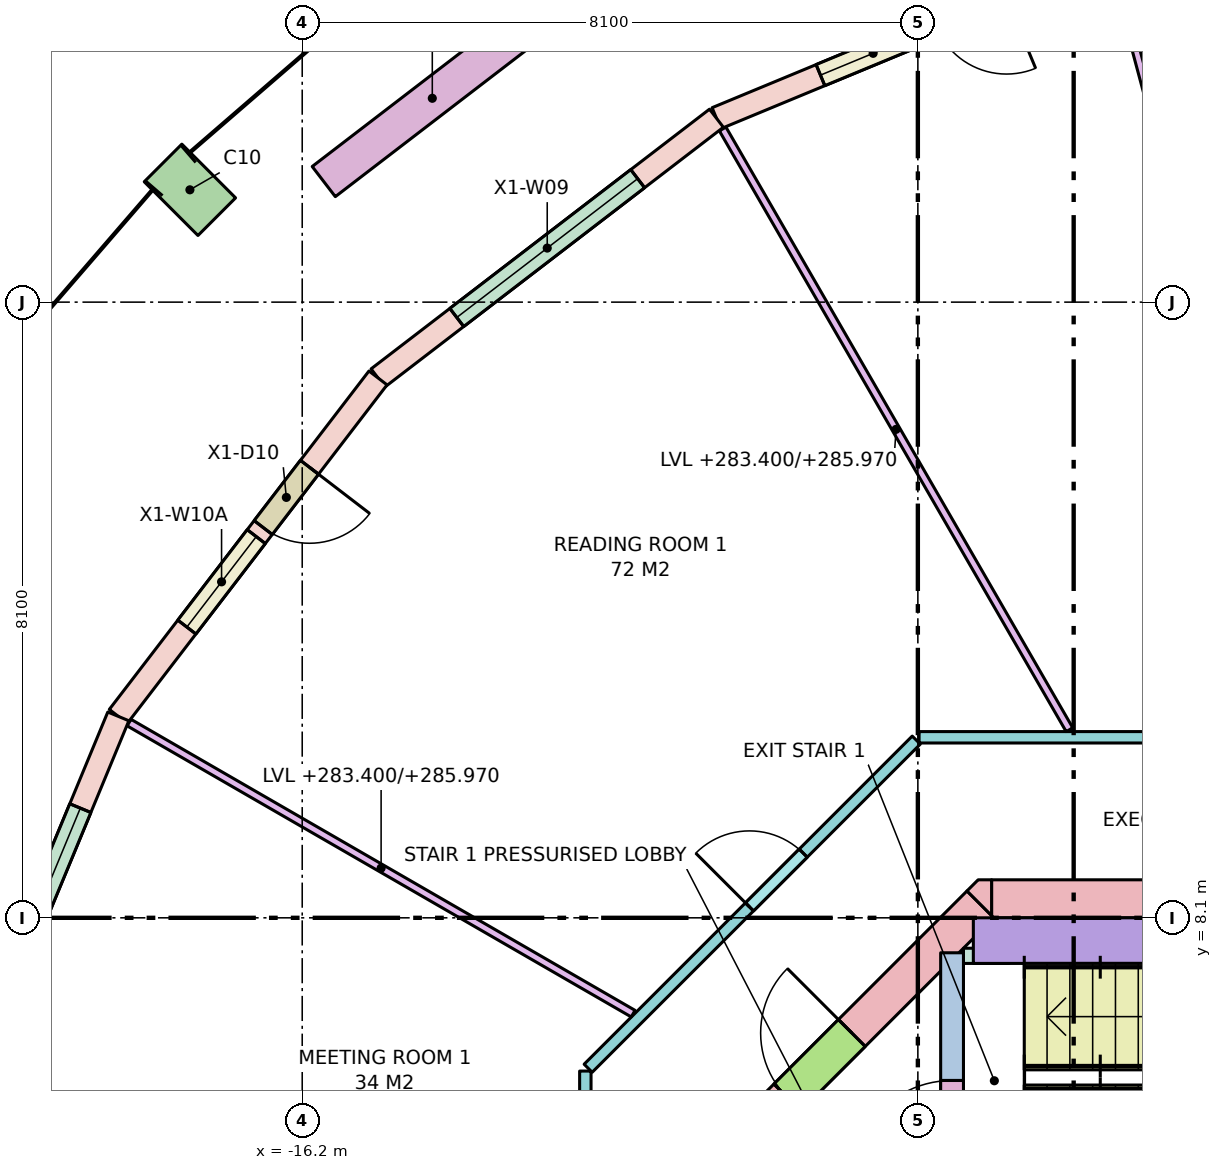
"""IFC4 building model, lengths in metres.
Left out: names, types, materials, properties, quantities, classifications, styles, units other than length and angle.
Written with IfcOpenShell. Run it as: python <this file> out.ifc"""

import sys

from ifc_helpers import new_model, si_unit, direction, frame, frame_2d, origin, origin_2d, place, context, subcontext, project, spatial, polyline, rectangle, outline, extrude, element, fill, save


model = new_model("IFC4")
c1 = context("Model", 3, precision=1e-05, world=origin(), true_north=direction((0.0, 1.0)))
c2 = subcontext(c1, "Body", "Model", "MODEL_VIEW")
j1 = project(units=[si_unit("LENGTHUNIT", "METRE"), si_unit("PLANEANGLEUNIT", "RADIAN")], contexts=[c1])
p1 = place(None, origin())
s1 = spatial("IfcSite", under=j1, at=p1, CompositionType="ELEMENT")
p2 = place(p1, origin())
s2 = spatial("IfcBuilding", under=s1, at=p2, CompositionType="ELEMENT")
p3 = place(p2, frame((0.0, 0.0, 283.4)))
s3 = spatial("IfcBuildingStorey", under=s2, at=p3, CompositionType="ELEMENT", Elevation=283.4)
p4 = place(p3, frame((-17.678, 17.678, 0.0), z_axis=(0.0, 0.0, 1.0), x_axis=(-0.707106781187, -0.707106781187, 0.0)))
e1 = element("IfcColumn", 1, at=p4, inside=s3, PredefinedType="COLUMN", context=c2, shape_type="SweptSolid", body=[
    extrude(rectangle(XDim=0.7, YDim=1.0, at=origin_2d()), origin(), (0.0, 0.0, 1.0), 3.7),
])
p5 = place(p3, frame((-7.13, 8.35, -0.28), z_axis=(0.0, 0.0, 1.0), x_axis=(1.0, 0.0, 0.0)))
e2 = element("IfcWall", 2, at=p5, inside=s3, PredefinedType="SHEAR", context=c2, shape_type="SweptSolid", body=[
    extrude(rectangle(XDim=14.26, YDim=0.5, at=frame_2d((7.13, 0.0))), origin(), (0.0, 0.0, 1.0), 3.7),
])
p6 = place(p5, frame((5.48, 0.0, 0.28)))
e3 = element("IfcOpeningElement", 3, at=p6, cuts=e2, PredefinedType="OPENING", context=c2, shape_type="SweptSolid", body=[
    extrude(rectangle(XDim=0.7, YDim=2.1, at=frame_2d((0.35, 1.05))), frame((0.0, 0.26, 0.0), z_axis=(0.0, -1.0, 0.0), x_axis=(1.0, 0.0, 0.0)), (0.0, 0.0, 1.0), 0.52),
])
p7 = place(p5, frame((7.155, 0.0, 0.28)))
e4 = element("IfcOpeningElement", 4, at=p7, cuts=e2, PredefinedType="OPENING", context=c2, shape_type="SweptSolid", body=[
    extrude(rectangle(XDim=0.9, YDim=2.1, at=frame_2d((0.45, 1.05))), frame((0.0, 0.26, 0.0), z_axis=(0.0, -1.0, 0.0), x_axis=(1.0, 0.0, 0.0)), (0.0, 0.0, 1.0), 0.52),
])
p8 = place(p3, frame((-10.277, 5.277, -0.28), z_axis=(0.0, 0.0, 1.0), x_axis=(0.707106781187, 0.707106781187, 0.0)))
e5 = element("IfcWall", 5, at=p8, inside=s3, PredefinedType="SHEAR", context=c2, shape_type="SweptSolid", body=[
    extrude(rectangle(XDim=4.243, YDim=0.5, at=frame_2d((2.121, 0.0))), origin(), (0.0, 0.0, 1.0), 3.7),
])
p9 = place(p8, frame((0.65, 0.0, 0.28)))
e6 = element("IfcOpeningElement", 6, at=p9, cuts=e5, PredefinedType="OPENING", context=c2, shape_type="SweptSolid", body=[
    extrude(rectangle(XDim=1.2, YDim=2.1, at=frame_2d((0.6, 1.05))), frame((0.0, 0.26, 0.0), z_axis=(0.0, -1.0, 0.0), x_axis=(1.0, 0.0, 0.0)), (0.0, 0.0, 1.0), 0.52),
])
p10 = place(p3, frame((0.0, 0.0, -0.28)))
e7 = element("IfcWall", 7, at=p10, inside=s3, PredefinedType="SHEAR", context=c2, shape_type="SweptSolid", body=[
    extrude(outline(polyline([(-7.307, 8.6), (-7.13, 8.6), (-7.13, 8.13), (-7.454, 8.454), (-7.307, 8.6)])), origin(), (0.0, 0.0, 1.0), 3.7),
])
p11 = place(p3, frame((-7.65, 4.5, 0.0), z_axis=(0.0, 0.0, 1.0), x_axis=(0.0, 1.0, 0.0)))
e8 = element("IfcWall", 8, at=p11, inside=s3, PredefinedType="SHEAR", context=c2, shape_type="SweptSolid", body=[
    extrude(rectangle(XDim=3.14, YDim=0.3, at=frame_2d((1.57, 0.0))), origin(), (0.0, 0.0, 1.0), 3.42),
])
p12 = place(p11, frame((0.14, 0.0, 0.0)))
e9 = element("IfcOpeningElement", 9, at=p12, cuts=e8, PredefinedType="OPENING", context=c2, shape_type="SweptSolid", body=[
    extrude(rectangle(XDim=1.32, YDim=2.1, at=frame_2d((0.66, 1.05))), frame((0.0, 0.16, 0.0), z_axis=(0.0, -1.0, 0.0), x_axis=(1.0, 0.0, 0.0)), (0.0, 0.0, 1.0), 0.32),
])
p13 = place(p3, frame((-7.37, 7.8, 0.0), z_axis=(0.0, 0.0, 1.0), x_axis=(1.0, 0.0, 0.0)))
e10 = element("IfcWall", 10, at=p13, inside=s3, PredefinedType="SHEAR", context=c2, shape_type="SweptSolid", body=[
    extrude(rectangle(XDim=5.37, YDim=0.6, at=frame_2d((2.685, 0.0))), origin(), (0.0, 0.0, 1.0), 3.42),
])
p14 = place(p3, frame((-7.5, 7.6, 0.0), z_axis=(0.0, 0.0, 1.0), x_axis=(1.0, 0.0, 0.0)))
e11 = element("IfcWall", 11, at=p14, inside=s3, PredefinedType="SHEAR", context=c2, shape_type="SweptSolid", body=[
    extrude(rectangle(XDim=0.6, YDim=0.2, at=frame_2d((0.3, 0.0))), origin(), (0.0, 0.0, 1.0), 3.42),
])
p15 = place(p3, frame((-5.565, 20.767, 0.0), z_axis=(0.0, 0.0, 1.0), x_axis=(-0.92387156362, -0.382702670405, 0.0)))
e12 = element("IfcWall", 12, at=p15, inside=s3, PredefinedType="STANDARD", context=c2, shape_type="SweptSolid", body=[
    extrude(rectangle(XDim=5.613, YDim=0.3, at=frame_2d((2.806, 0.0))), origin(), (0.0, 0.0, 1.0), 3.42),
])
p16 = place(p15, frame((1.481, 0.0, 0.0)))
e13 = element("IfcOpeningElement", 13, at=p16, cuts=e12, PredefinedType="OPENING", context=c2, shape_type="SweptSolid", body=[
    extrude(rectangle(XDim=1.0, YDim=2.4, at=frame_2d((0.5, 1.2))), frame((0.0, 0.16, 0.0), z_axis=(0.0, -1.0, 0.0), x_axis=(1.0, 0.0, 0.0)), (0.0, 0.0, 1.0), 0.32),
])
p17 = place(p15, frame((2.631, 0.0, 0.8)))
e14 = element("IfcOpeningElement", 14, at=p17, cuts=e12, PredefinedType="OPENING", context=c2, shape_type="SweptSolid", body=[
    extrude(rectangle(XDim=1.5, YDim=2.4, at=frame_2d((0.75, 1.2))), frame((0.0, 0.16, 0.0), z_axis=(0.0, -1.0, 0.0), x_axis=(1.0, 0.0, 0.0)), (0.0, 0.0, 1.0), 0.32),
])
p18 = place(p3, frame((-10.75, 18.619, 0.0), z_axis=(0.0, 0.0, 1.0), x_axis=(-0.793380165925, -0.608726467567, 0.0)))
e15 = element("IfcWall", 15, at=p18, inside=s3, PredefinedType="STANDARD", context=c2, shape_type="SweptSolid", body=[
    extrude(rectangle(XDim=5.613, YDim=0.3, at=frame_2d((2.806, 0.0))), origin(), (0.0, 0.0, 1.0), 3.42),
])
p19 = place(p18, frame((1.306, 0.0, 0.8)))
e16 = element("IfcOpeningElement", 16, at=p19, cuts=e15, PredefinedType="OPENING", context=c2, shape_type="SweptSolid", body=[
    extrude(rectangle(XDim=3.0, YDim=2.4, at=frame_2d((1.5, 1.2))), frame((0.0, 0.16, 0.0), z_axis=(0.0, -1.0, 0.0), x_axis=(1.0, 0.0, 0.0)), (0.0, 0.0, 1.0), 0.32),
])
p20 = place(p3, frame((-15.203, 15.203, 0.0), z_axis=(0.0, 0.0, 1.0), x_axis=(-0.608726467567, -0.793380165925, 0.0)))
e17 = element("IfcWall", 17, at=p20, inside=s3, PredefinedType="STANDARD", context=c2, shape_type="SweptSolid", body=[
    extrude(rectangle(XDim=5.613, YDim=0.3, at=frame_2d((2.806, 0.0))), origin(), (0.0, 0.0, 1.0), 3.42),
])
p21 = place(p20, frame((1.481, 0.0, 0.0)))
e18 = element("IfcOpeningElement", 18, at=p21, cuts=e17, PredefinedType="OPENING", context=c2, shape_type="SweptSolid", body=[
    extrude(rectangle(XDim=1.0, YDim=2.4, at=frame_2d((0.5, 1.2))), frame((0.0, 0.16, 0.0), z_axis=(0.0, -1.0, 0.0), x_axis=(1.0, 0.0, 0.0)), (0.0, 0.0, 1.0), 0.32),
])
p22 = place(p20, frame((2.631, 0.0, 0.8)))
e19 = element("IfcOpeningElement", 19, at=p22, cuts=e17, PredefinedType="OPENING", context=c2, shape_type="SweptSolid", body=[
    extrude(rectangle(XDim=1.5, YDim=2.4, at=frame_2d((0.75, 1.2))), frame((0.0, 0.16, 0.0), z_axis=(0.0, -1.0, 0.0), x_axis=(1.0, 0.0, 0.0)), (0.0, 0.0, 1.0), 0.32),
])
p23 = place(p3, frame((-18.619, 10.75, 0.0), z_axis=(0.0, 0.0, 1.0), x_axis=(-0.382702670405, -0.92387156362, 0.0)))
e20 = element("IfcWall", 20, at=p23, inside=s3, PredefinedType="STANDARD", context=c2, shape_type="SweptSolid", body=[
    extrude(rectangle(XDim=5.613, YDim=0.3, at=frame_2d((2.806, 0.0))), origin(), (0.0, 0.0, 1.0), 3.42),
])
p24 = place(p23, frame((1.306, 0.0, 0.8)))
e21 = element("IfcOpeningElement", 21, at=p24, cuts=e20, PredefinedType="OPENING", context=c2, shape_type="SweptSolid", body=[
    extrude(rectangle(XDim=3.0, YDim=2.4, at=frame_2d((1.5, 1.2))), frame((0.0, 0.16, 0.0), z_axis=(0.0, -1.0, 0.0), x_axis=(1.0, 0.0, 0.0)), (0.0, 0.0, 1.0), 0.32),
])
p25 = place(p3, frame((-13.061, 19.978, 0.0), z_axis=(0.0, 0.0, 1.0), x_axis=(-0.793326845617, -0.608795955984, 0.0)))
e22 = element("IfcWall", 22, at=p25, inside=s3, PredefinedType="PARAPET", context=c2, shape_type="SweptSolid", body=[
    extrude(rectangle(XDim=3.6, YDim=0.5, at=frame_2d((1.8, 0.0))), origin(), (0.0, 0.0, 1.0), 0.9),
])
p26 = place(p3, frame((-12.475, -6.084, 0.0), z_axis=(0.0, 0.0, 1.0), x_axis=(0.0, 1.0, 0.0)))
e23 = element("IfcWall", 23, at=p26, inside=s3, PredefinedType="PARTITIONING", context=c2, shape_type="SweptSolid", body=[
    extrude(rectangle(XDim=12.167, YDim=0.15, at=frame_2d((6.084, 0.0))), origin(), (0.0, 0.0, 1.0), 2.57),
])
p27 = place(p26, frame((10.322, 0.0, 0.0)))
e24 = element("IfcOpeningElement", 24, at=p27, cuts=e23, PredefinedType="OPENING", context=c2, shape_type="SweptSolid", body=[
    extrude(rectangle(XDim=0.9, YDim=2.1, at=frame_2d((0.45, 1.05))), frame((0.0, 0.085, 0.0), z_axis=(0.0, -1.0, 0.0), x_axis=(1.0, 0.0, 0.0)), (0.0, 0.0, 1.0), 0.17),
])
p28 = place(p26, frame((7.256, 0.0, 0.0)))
e25 = element("IfcOpeningElement", 25, at=p28, cuts=e23, PredefinedType="OPENING", context=c2, shape_type="SweptSolid", body=[
    extrude(rectangle(XDim=1.0, YDim=2.1, at=frame_2d((0.5, 1.05))), frame((0.0, 0.085, 0.0), z_axis=(0.0, -1.0, 0.0), x_axis=(1.0, 0.0, 0.0)), (0.0, 0.0, 1.0), 0.17),
])
p29 = place(p26, frame((3.912, 0.0, 0.0)))
e26 = element("IfcOpeningElement", 26, at=p29, cuts=e23, PredefinedType="OPENING", context=c2, shape_type="SweptSolid", body=[
    extrude(rectangle(XDim=1.0, YDim=2.1, at=frame_2d((0.5, 1.05))), frame((0.0, 0.085, 0.0), z_axis=(0.0, -1.0, 0.0), x_axis=(1.0, 0.0, 0.0)), (0.0, 0.0, 1.0), 0.17),
])
p30 = place(p26, frame((0.946, 0.0, 0.0)))
e27 = element("IfcOpeningElement", 27, at=p30, cuts=e23, PredefinedType="OPENING", context=c2, shape_type="SweptSolid", body=[
    extrude(rectangle(XDim=0.9, YDim=2.1, at=frame_2d((0.45, 1.05))), frame((0.0, 0.085, 0.0), z_axis=(0.0, -1.0, 0.0), x_axis=(1.0, 0.0, 0.0)), (0.0, 0.0, 1.0), 0.17),
])
p31 = place(p3, frame((-12.438, 6.121, 0.0), z_axis=(0.0, 0.0, 1.0), x_axis=(0.707106781187, 0.707106781187, 0.0)))
e28 = element("IfcWall", 28, at=p31, inside=s3, PredefinedType="PARTITIONING", context=c2, shape_type="SweptSolid", body=[
    extrude(rectangle(XDim=6.105, YDim=0.15, at=frame_2d((3.053, 0.0))), origin(), (0.0, 0.0, 1.0), 2.57),
])
p32 = place(p31, frame((3.002, 0.0, 0.0)))
e29 = element("IfcOpeningElement", 29, at=p32, cuts=e28, PredefinedType="OPENING", context=c2, shape_type="SweptSolid", body=[
    extrude(rectangle(XDim=1.0, YDim=2.1, at=frame_2d((0.5, 1.05))), frame((0.0, 0.085, 0.0), z_axis=(0.0, -1.0, 0.0), x_axis=(1.0, 0.0, 0.0)), (0.0, 0.0, 1.0), 0.17),
])
p33 = place(p3, frame((-8.084, 10.475, 0.0), z_axis=(0.0, 0.0, 1.0), x_axis=(1.0, 0.0, 0.0)))
e30 = element("IfcWall", 30, at=p33, inside=s3, PredefinedType="PARTITIONING", context=c2, shape_type="SweptSolid", body=[
    extrude(rectangle(XDim=16.167, YDim=0.15, at=frame_2d((8.084, 0.0))), origin(), (0.0, 0.0, 1.0), 2.57),
])
p34 = place(p33, frame((13.004, 0.0, 0.0)))
e31 = element("IfcOpeningElement", 31, at=p34, cuts=e30, PredefinedType="OPENING", context=c2, shape_type="SweptSolid", body=[
    extrude(rectangle(XDim=1.0, YDim=2.1, at=frame_2d((0.5, 1.05))), frame((0.0, 0.085, 0.0), z_axis=(0.0, -1.0, 0.0), x_axis=(1.0, 0.0, 0.0)), (0.0, 0.0, 1.0), 0.17),
])
p35 = place(p33, frame((7.184, 0.0, 0.0)))
e32 = element("IfcOpeningElement", 32, at=p35, cuts=e30, PredefinedType="OPENING", context=c2, shape_type="SweptSolid", body=[
    extrude(rectangle(XDim=1.8, YDim=2.1, at=frame_2d((0.9, 1.05))), frame((0.0, 0.085, 0.0), z_axis=(0.0, -1.0, 0.0), x_axis=(1.0, 0.0, 0.0)), (0.0, 0.0, 1.0), 0.17),
])
p36 = place(p33, frame((3.153, 0.0, 0.0)))
e33 = element("IfcOpeningElement", 33, at=p36, cuts=e30, PredefinedType="OPENING", context=c2, shape_type="SweptSolid", body=[
    extrude(rectangle(XDim=1.0, YDim=2.1, at=frame_2d((0.5, 1.05))), frame((0.0, 0.085, 0.0), z_axis=(0.0, -1.0, 0.0), x_axis=(1.0, 0.0, 0.0)), (0.0, 0.0, 1.0), 0.17),
])
p37 = place(p3, frame((-2.831, 10.564, 0.0), z_axis=(0.0, 0.0, 1.0), x_axis=(-0.258796321138, 0.965931914871, 0.0)))
e34 = element("IfcWall", 34, at=p37, inside=s3, PredefinedType="PARTITIONING", context=c2, shape_type="SweptSolid", body=[
    extrude(rectangle(XDim=10.4, YDim=0.1, at=frame_2d((5.2, 0.0))), origin(), (0.0, 0.0, 1.0), 2.57),
])
p38 = place(p3, frame((-6.105, 10.575, 0.0), z_axis=(0.0, 0.0, 1.0), x_axis=(-0.500020406621, 0.866013621696, 0.0)))
e35 = element("IfcWall", 35, at=p38, inside=s3, PredefinedType="PARTITIONING", context=c2, shape_type="SweptSolid", body=[
    extrude(rectangle(XDim=9.126, YDim=0.1, at=frame_2d((4.563, 0.0))), origin(), (0.0, 0.0, 1.0), 2.57),
])
p39 = place(p3, frame((-11.846, 6.839, 0.0), z_axis=(0.0, 0.0, 1.0), x_axis=(-0.866007734672, 0.500030602552, 0.0)))
e36 = element("IfcWall", 36, at=p39, inside=s3, PredefinedType="PARTITIONING", context=c2, shape_type="SweptSolid", body=[
    extrude(rectangle(XDim=7.658, YDim=0.1, at=frame_2d((3.829, 0.0))), origin(), (0.0, 0.0, 1.0), 2.57),
])
p40 = place(p17, origin())
e37 = element("IfcWindow", 37, at=p40, inside=s3, PartitioningType="SINGLE_PANEL", PredefinedType="WINDOW", context=c2, shape_type="SweptSolid", body=[
    extrude(rectangle(XDim=1.5, YDim=2.4, at=frame_2d((0.75, 1.2))), frame((0.0, 0.03, 0.0), z_axis=(0.0, -1.0, 0.0), x_axis=(1.0, 0.0, 0.0)), (0.0, 0.0, 1.0), 0.06),
])
fill(e14, e37)
p41 = place(p19, origin())
e38 = element("IfcWindow", 38, at=p41, inside=s3, PartitioningType="SINGLE_PANEL", PredefinedType="WINDOW", context=c2, shape_type="SweptSolid", body=[
    extrude(rectangle(XDim=3.0, YDim=2.4, at=frame_2d((1.5, 1.2))), frame((0.0, 0.03, 0.0), z_axis=(0.0, -1.0, 0.0), x_axis=(1.0, 0.0, 0.0)), (0.0, 0.0, 1.0), 0.06),
])
fill(e16, e38)
p42 = place(p21, origin())
e39 = element("IfcDoor", 39, at=p42, inside=s3, OperationType="SINGLE_SWING_LEFT", PredefinedType="DOOR", context=c2, shape_type="SweptSolid", body=[
    extrude(rectangle(XDim=1.0, YDim=2.4, at=frame_2d((0.5, 1.2))), frame((0.0, 0.025, 0.0), z_axis=(0.0, -1.0, 0.0), x_axis=(1.0, 0.0, 0.0)), (0.0, 0.0, 1.0), 0.05),
])
fill(e18, e39)
p43 = place(p22, origin())
e40 = element("IfcWindow", 40, at=p43, inside=s3, PartitioningType="SINGLE_PANEL", PredefinedType="WINDOW", context=c2, shape_type="SweptSolid", body=[
    extrude(rectangle(XDim=1.5, YDim=2.4, at=frame_2d((0.75, 1.2))), frame((0.0, 0.03, 0.0), z_axis=(0.0, -1.0, 0.0), x_axis=(1.0, 0.0, 0.0)), (0.0, 0.0, 1.0), 0.06),
])
fill(e19, e40)
p44 = place(p24, origin())
e41 = element("IfcWindow", 41, at=p44, inside=s3, PartitioningType="SINGLE_PANEL", PredefinedType="WINDOW", context=c2, shape_type="SweptSolid", body=[
    extrude(rectangle(XDim=3.0, YDim=2.4, at=frame_2d((1.5, 1.2))), frame((0.0, 0.03, 0.0), z_axis=(0.0, -1.0, 0.0), x_axis=(1.0, 0.0, 0.0)), (0.0, 0.0, 1.0), 0.06),
])
fill(e21, e41)
p45 = place(p12, origin())
e42 = element("IfcDoor", 42, at=p45, inside=s3, OperationType="DOUBLE_DOOR_SINGLE_SWING", PredefinedType="DOOR", context=c2, shape_type="SweptSolid", body=[
    extrude(rectangle(XDim=1.32, YDim=2.1, at=frame_2d((0.66, 1.05))), frame((0.0, 0.025, 0.0), z_axis=(0.0, -1.0, 0.0), x_axis=(1.0, 0.0, 0.0)), (0.0, 0.0, 1.0), 0.05),
])
fill(e9, e42)
p46 = place(p9, origin())
e43 = element("IfcDoor", 43, at=p46, inside=s3, OperationType="SINGLE_SWING_RIGHT", PredefinedType="DOOR", context=c2, shape_type="SweptSolid", body=[
    extrude(rectangle(XDim=1.2, YDim=2.1, at=frame_2d((0.6, 1.05))), frame((0.0, 0.025, 0.0), z_axis=(0.0, -1.0, 0.0), x_axis=(1.0, 0.0, 0.0)), (0.0, 0.0, 1.0), 0.05),
])
fill(e6, e43)
p47 = place(p32, origin())
e44 = element("IfcDoor", 44, at=p47, inside=s3, OperationType="SINGLE_SWING_LEFT", PredefinedType="DOOR", context=c2, shape_type="SweptSolid", body=[
    extrude(rectangle(XDim=1.0, YDim=2.1, at=frame_2d((0.5, 1.05))), frame((0.0, 0.025, 0.0), z_axis=(0.0, -1.0, 0.0), x_axis=(1.0, 0.0, 0.0)), (0.0, 0.0, 1.0), 0.05),
])
fill(e29, e44)
save(model, sys.argv[1])
